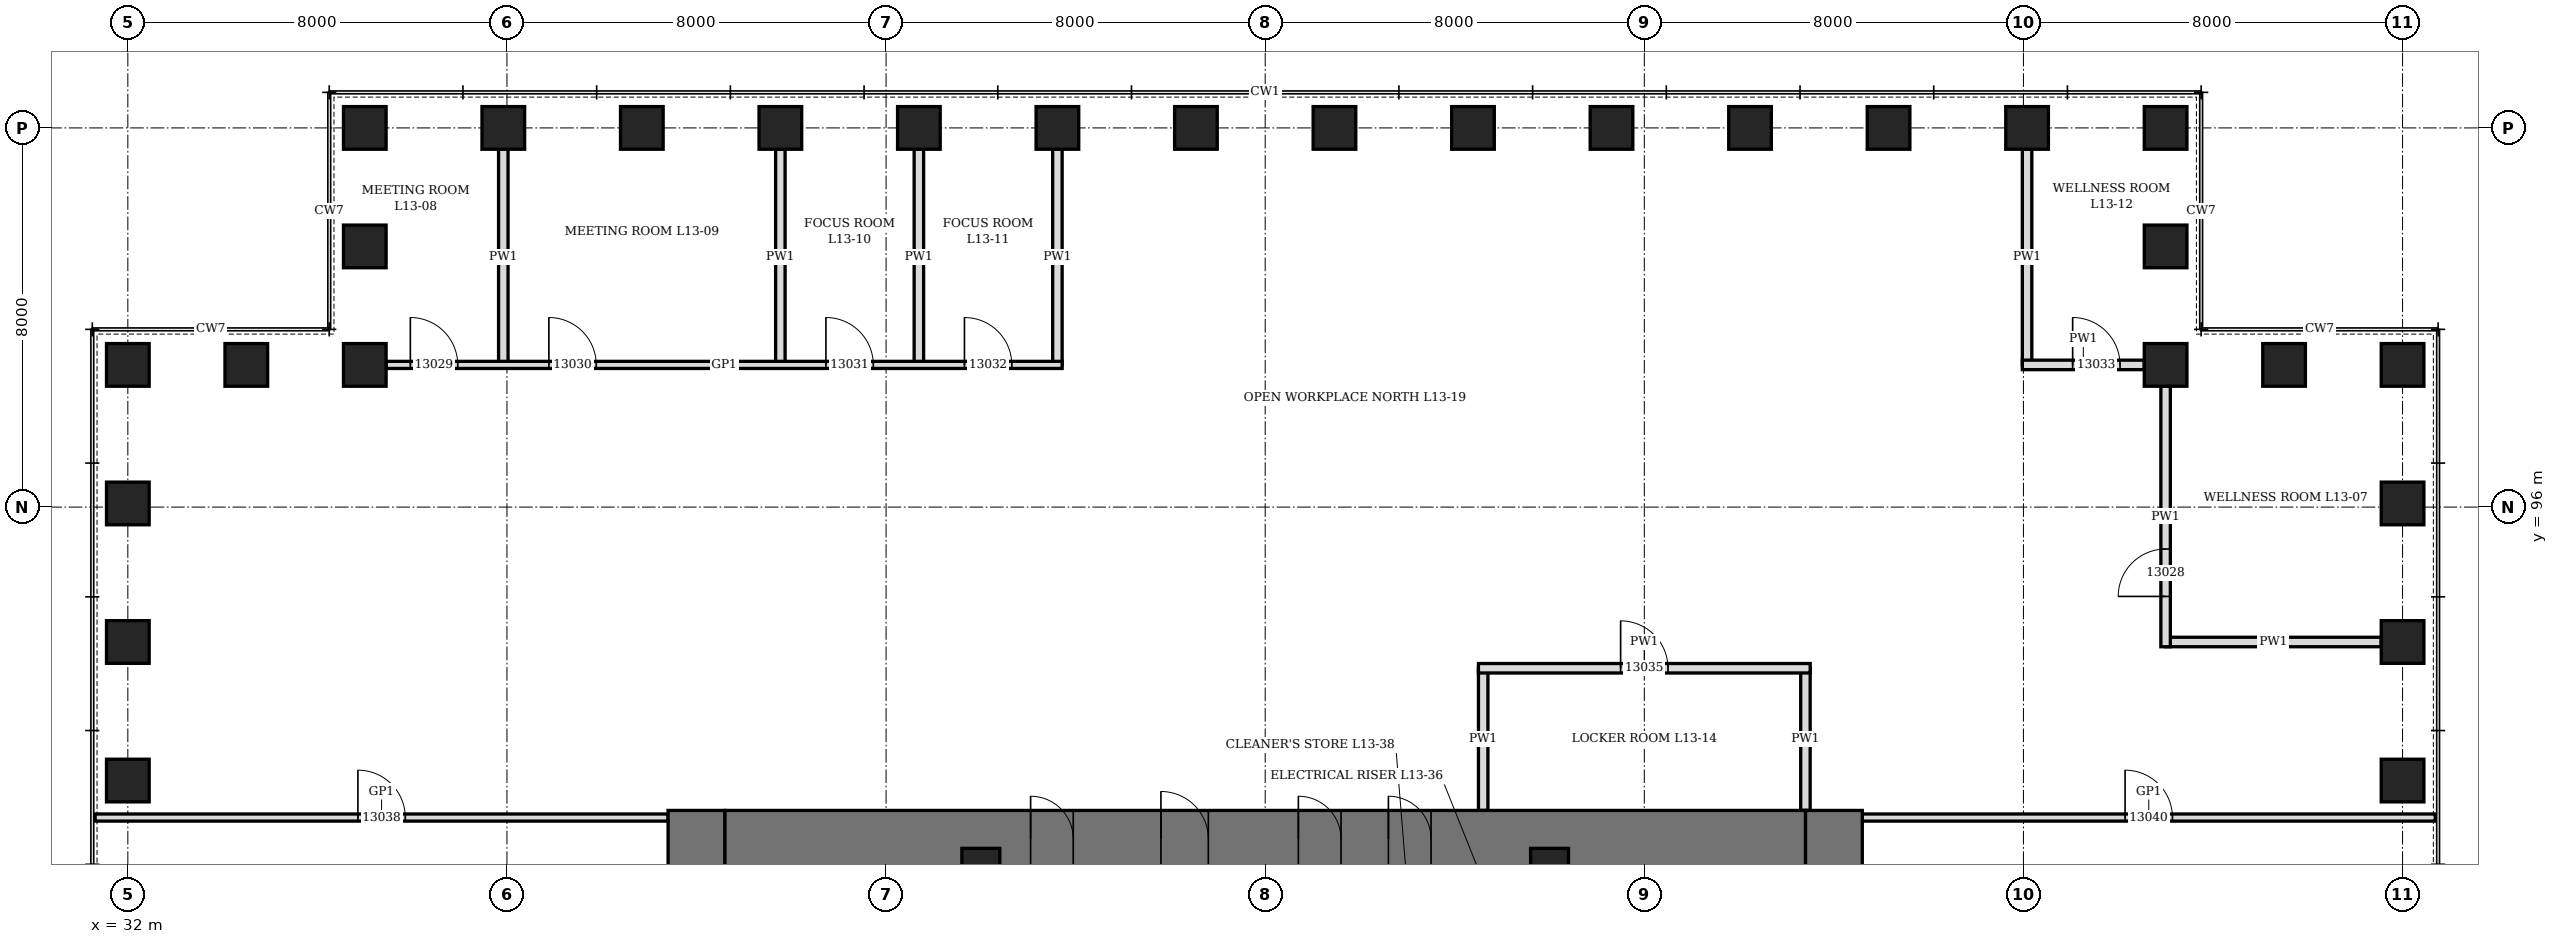
"""IFC4 building model, lengths in metres.
Left out: names, types, materials, properties, quantities, classifications, styles, units other than length and angle.
Written with IfcOpenShell. Run it as: python <this file> out.ifc"""

import sys

from ifc_helpers import new_model, si_unit, direction, frame, frame_2d, origin, origin_2d, place, context, subcontext, project, spatial, rectangle, hollow_rectangle, extrude, element, fill, save


model = new_model("IFC4")
c1 = context("Model", 3, precision=1e-05, world=origin(), true_north=direction((0.0, 1.0)))
c2 = subcontext(c1, "Body", "Model", "MODEL_VIEW")
j1 = project(units=[si_unit("LENGTHUNIT", "METRE"), si_unit("PLANEANGLEUNIT", "RADIAN")], contexts=[c1])
p1 = place(None, origin())
s1 = spatial("IfcSite", under=j1, at=p1, CompositionType="ELEMENT")
p2 = place(p1, origin())
s2 = spatial("IfcBuilding", under=s1, at=p2, CompositionType="ELEMENT")
p3 = place(p2, frame((0.0, 0.0, 64.3)))
s3 = spatial("IfcBuildingStorey", under=s2, at=p3, CompositionType="ELEMENT", Elevation=64.3)
for number, where, z_axis, x_axis in (
    (1, (80.0, 90.231, 0.0), (0.0, 0.0, 1.0), (0.0, 1.0, 0.0)),
    (2, (80.0, 93.154, 0.0), (0.0, 0.0, 1.0), (0.0, 1.0, 0.0)),
    (3, (80.0, 96.077, 0.0), (0.0, 0.0, 1.0), (0.0, 1.0, 0.0)),
    (4, (80.0, 99.0, 0.0), (0.0, 0.0, 1.0), (1.0, 0.0, 0.0)),
    (5, (77.5, 99.0, 0.0), (0.0, 0.0, 1.0), (1.0, 0.0, 0.0)),
    (6, (75.0, 99.0, 0.0), (0.0, 0.0, 1.0), (0.0, 1.0, 0.0)),
    (7, (75.0, 101.5, 0.0), (0.0, 0.0, 1.0), (0.0, 1.0, 0.0)),
    (8, (75.0, 104.0, 0.0), (0.0, 0.0, 1.0), (1.0, 0.0, 0.0)),
    (9, (72.077, 104.0, 0.0), (0.0, 0.0, 1.0), (1.0, 0.0, 0.0)),
    (10, (69.154, 104.0, 0.0), (0.0, 0.0, 1.0), (1.0, 0.0, 0.0)),
    (11, (66.231, 104.0, 0.0), (0.0, 0.0, 1.0), (1.0, 0.0, 0.0)),
    (12, (63.308, 104.0, 0.0), (0.0, 0.0, 1.0), (1.0, 0.0, 0.0)),
    (13, (60.385, 104.0, 0.0), (0.0, 0.0, 1.0), (1.0, 0.0, 0.0)),
    (14, (57.461, 104.0, 0.0), (0.0, 0.0, 1.0), (1.0, 0.0, 0.0)),
    (15, (54.539, 104.0, 0.0), (0.0, 0.0, 1.0), (1.0, 0.0, 0.0)),
    (16, (51.615, 104.0, 0.0), (0.0, 0.0, 1.0), (1.0, 0.0, 0.0)),
    (17, (48.692, 104.0, 0.0), (0.0, 0.0, 1.0), (1.0, 0.0, 0.0)),
    (18, (45.769, 104.0, 0.0), (0.0, 0.0, 1.0), (1.0, 0.0, 0.0)),
    (19, (42.846, 104.0, 0.0), (0.0, 0.0, 1.0), (1.0, 0.0, 0.0)),
    (20, (39.923, 104.0, 0.0), (0.0, 0.0, 1.0), (1.0, 0.0, 0.0)),
    (21, (37.0, 104.0, 0.0), (0.0, 0.0, 1.0), (0.0, 1.0, 0.0)),
    (22, (37.0, 101.5, 0.0), (0.0, 0.0, 1.0), (0.0, 1.0, 0.0)),
    (23, (37.0, 99.0, 0.0), (0.0, 0.0, 1.0), (1.0, 0.0, 0.0)),
    (24, (34.5, 99.0, 0.0), (0.0, 0.0, 1.0), (1.0, 0.0, 0.0)),
    (25, (32.0, 99.0, 0.0), (0.0, 0.0, 1.0), (0.0, 1.0, 0.0)),
    (26, (32.0, 96.077, 0.0), (0.0, 0.0, 1.0), (0.0, 1.0, 0.0)),
    (27, (32.0, 93.154, 0.0), (0.0, 0.0, 1.0), (0.0, 1.0, 0.0)),
    (28, (32.0, 90.231, 0.0), (0.0, 0.0, 1.0), (0.0, 1.0, 0.0)),
):
    element("IfcColumn", number, at=place(p3, frame(where, z_axis=z_axis, x_axis=x_axis)), inside=s3, PredefinedType="COLUMN", context=c2, shape_type="SweptSolid", body=[
        extrude(hollow_rectangle(XDim=0.9, YDim=0.9, WallThickness=0.12, at=origin_2d()), origin(), (0.0, 0.0, 1.0), 4.2),
    ])
p4 = place(p3, frame((44.0, 70.4, 0.0), z_axis=(0.0, 0.0, 1.0), x_axis=(0.0, 1.0, 0.0)))
e29 = element("IfcWall", 29, at=p4, inside=s3, PredefinedType="SHEAR", context=c2, shape_type="SweptSolid", body=[
    extrude(rectangle(XDim=19.2, YDim=1.2, at=frame_2d((9.6, 0.0))), origin(), (0.0, 0.0, 1.0), 4.2),
])
p5 = place(p4, frame((8.6, 0.0, 0.0)))
e30 = element("IfcOpeningElement", 30, at=p5, cuts=e29, PredefinedType="OPENING", context=c2, shape_type="SweptSolid", body=[
    extrude(rectangle(XDim=2.0, YDim=2.4, at=frame_2d((1.0, 1.2))), frame((0.0, 0.61, 0.0), z_axis=(0.0, -1.0, 0.0), x_axis=(1.0, 0.0, 0.0)), (0.0, 0.0, 1.0), 1.22),
])
p6 = place(p3, frame((68.0, 70.4, 0.0), z_axis=(0.0, 0.0, 1.0), x_axis=(0.0, 1.0, 0.0)))
e31 = element("IfcWall", 31, at=p6, inside=s3, PredefinedType="SHEAR", context=c2, shape_type="SweptSolid", body=[
    extrude(rectangle(XDim=19.2, YDim=1.2, at=frame_2d((9.6, 0.0))), origin(), (0.0, 0.0, 1.0), 4.2),
])
p7 = place(p6, frame((8.6, 0.0, 0.0)))
e32 = element("IfcOpeningElement", 32, at=p7, cuts=e31, PredefinedType="OPENING", context=c2, shape_type="SweptSolid", body=[
    extrude(rectangle(XDim=2.0, YDim=2.4, at=frame_2d((1.0, 1.2))), frame((0.0, 0.61, 0.0), z_axis=(0.0, -1.0, 0.0), x_axis=(1.0, 0.0, 0.0)), (0.0, 0.0, 1.0), 1.22),
])
p8 = place(p3, frame((44.6, 89.0, 0.0), z_axis=(0.0, 0.0, 1.0), x_axis=(1.0, 0.0, 0.0)))
e33 = element("IfcWall", 33, at=p8, inside=s3, PredefinedType="SHEAR", context=c2, shape_type="SweptSolid", body=[
    extrude(rectangle(XDim=22.8, YDim=1.2, at=frame_2d((11.4, 0.0))), origin(), (0.0, 0.0, 1.0), 4.2),
])
p9 = place(p8, frame((9.2, 0.0, 0.0)))
e34 = element("IfcOpeningElement", 34, at=p9, cuts=e33, PredefinedType="OPENING", context=c2, shape_type="SweptSolid", body=[
    extrude(rectangle(XDim=1.0, YDim=2.1, at=frame_2d((0.5, 1.05))), frame((0.0, 0.61, 0.0), z_axis=(0.0, -1.0, 0.0), x_axis=(1.0, 0.0, 0.0)), (0.0, 0.0, 1.0), 1.22),
])
p10 = place(p8, frame((6.45, 0.0, 0.0)))
e35 = element("IfcOpeningElement", 35, at=p10, cuts=e33, PredefinedType="OPENING", context=c2, shape_type="SweptSolid", body=[
    extrude(rectangle(XDim=0.9, YDim=2.1, at=frame_2d((0.45, 1.05))), frame((0.0, 0.61, 0.0), z_axis=(0.0, -1.0, 0.0), x_axis=(1.0, 0.0, 0.0)), (0.0, 0.0, 1.0), 1.22),
])
p11 = place(p8, frame((12.1, 0.0, 0.0)))
e36 = element("IfcOpeningElement", 36, at=p11, cuts=e33, PredefinedType="OPENING", context=c2, shape_type="SweptSolid", body=[
    extrude(rectangle(XDim=0.9, YDim=2.1, at=frame_2d((0.45, 1.05))), frame((0.0, 0.61, 0.0), z_axis=(0.0, -1.0, 0.0), x_axis=(1.0, 0.0, 0.0)), (0.0, 0.0, 1.0), 1.22),
])
p12 = place(p8, frame((14.0, 0.0, 0.0)))
e37 = element("IfcOpeningElement", 37, at=p12, cuts=e33, PredefinedType="OPENING", context=c2, shape_type="SweptSolid", body=[
    extrude(rectangle(XDim=0.9, YDim=2.1, at=frame_2d((0.45, 1.05))), frame((0.0, 0.61, 0.0), z_axis=(0.0, -1.0, 0.0), x_axis=(1.0, 0.0, 0.0)), (0.0, 0.0, 1.0), 1.22),
])
for number, where, z_axis, x_axis in (
    (38, (50.0, 88.4, 0.0), (0.0, 0.0, 1.0), (1.0, 0.0, 0.0)),
    (39, (62.0, 88.4, 0.0), (0.0, 0.0, 1.0), (1.0, 0.0, 0.0)),
):
    element("IfcColumn", number, at=place(p3, frame(where, z_axis=z_axis, x_axis=x_axis)), inside=s3, PredefinedType="COLUMN", context=c2, shape_type="SweptSolid", body=[
        extrude(hollow_rectangle(XDim=0.8, YDim=0.8, WallThickness=0.1, at=origin_2d()), origin(), (0.0, 0.0, 1.0), 4.2),
    ])
for number, where, z_axis, x_axis in (
    (40, (75.0, 93.154, 0.0), (0.0, 0.0, 1.0), (1.0, 0.0, 0.0)),
    (41, (39.923, 99.0, 0.0), (0.0, 0.0, 1.0), (0.0, 1.0, 0.0)),
):
    element("IfcWall", number, at=place(p3, frame(where, z_axis=z_axis, x_axis=x_axis)), inside=s3, PredefinedType="PARTITIONING", context=c2, shape_type="SweptSolid", body=[
        extrude(rectangle(XDim=4.55, YDim=0.2, at=frame_2d((2.275, 0.0))), origin(), (0.0, 0.0, 1.0), 3.428),
    ])
for number, where, z_axis, x_axis in (
    (42, (45.769, 99.0, 0.0), (0.0, 0.0, 1.0), (0.0, 1.0, 0.0)),
    (43, (48.692, 99.0, 0.0), (0.0, 0.0, 1.0), (0.0, 1.0, 0.0)),
    (44, (51.615, 99.0, 0.0), (0.0, 0.0, 1.0), (0.0, 1.0, 0.0)),
):
    element("IfcWall", number, at=place(p3, frame(where, z_axis=z_axis, x_axis=x_axis)), inside=s3, PredefinedType="PARTITIONING", context=c2, shape_type="SweptSolid", body=[
        extrude(rectangle(XDim=4.55, YDim=0.2, at=frame_2d((2.275, 0.0))), origin(), (0.0, 0.0, 1.0), 3.278),
    ])
p13 = place(p3, frame((72.077, 99.0, 0.0), z_axis=(0.0, 0.0, 1.0), x_axis=(0.0, 1.0, 0.0)))
e45 = element("IfcWall", 45, at=p13, inside=s3, PredefinedType="PARTITIONING", context=c2, shape_type="SweptSolid", body=[
    extrude(rectangle(XDim=4.55, YDim=0.2, at=frame_2d((2.275, 0.0))), origin(), (0.0, 0.0, 1.0), 3.428),
])
for number, where, z_axis, x_axis in (
    (46, (60.6, 89.6, 0.0), (0.0, 0.0, 1.0), (0.0, 1.0, 0.0)),
    (47, (67.4, 89.6, 0.0), (0.0, 0.0, 1.0), (0.0, 1.0, 0.0)),
):
    element("IfcWall", number, at=place(p3, frame(where, z_axis=z_axis, x_axis=x_axis)), inside=s3, PredefinedType="PARTITIONING", context=c2, shape_type="SweptSolid", body=[
        extrude(rectangle(XDim=3.0, YDim=0.2, at=frame_2d((1.5, 0.0))), origin(), (0.0, 0.0, 1.0), 4.04),
    ])
p14 = place(p3, frame((31.31, 89.45, 0.0), z_axis=(0.0, 0.0, 1.0), x_axis=(1.0, 0.0, 0.0)))
e48 = element("IfcWall", 48, at=p14, inside=s3, PredefinedType="PARTITIONING", context=c2, shape_type="SweptSolid", body=[
    extrude(rectangle(XDim=12.09, YDim=0.15, at=frame_2d((6.045, 0.0))), origin(), (0.0, 0.0, 1.0), 4.04),
])
p15 = place(p14, frame((5.545, 0.0, 0.0)))
e49 = element("IfcOpeningElement", 49, at=p15, cuts=e48, PredefinedType="OPENING", context=c2, shape_type="SweptSolid", body=[
    extrude(rectangle(XDim=1.0, YDim=2.4, at=frame_2d((0.5, 1.2))), frame((0.0, 0.085, 0.0), z_axis=(0.0, -1.0, 0.0), x_axis=(1.0, 0.0, 0.0)), (0.0, 0.0, 1.0), 0.17),
])
p16 = place(p3, frame((68.6, 89.45, 0.0), z_axis=(0.0, 0.0, 1.0), x_axis=(1.0, 0.0, 0.0)))
e50 = element("IfcWall", 50, at=p16, inside=s3, PredefinedType="PARTITIONING", context=c2, shape_type="SweptSolid", body=[
    extrude(rectangle(XDim=12.09, YDim=0.15, at=frame_2d((6.045, 0.0))), origin(), (0.0, 0.0, 1.0), 4.04),
])
p17 = place(p16, frame((5.545, 0.0, 0.0)))
e51 = element("IfcOpeningElement", 51, at=p17, cuts=e50, PredefinedType="OPENING", context=c2, shape_type="SweptSolid", body=[
    extrude(rectangle(XDim=1.0, YDim=2.4, at=frame_2d((0.5, 1.2))), frame((0.0, 0.085, 0.0), z_axis=(0.0, -1.0, 0.0), x_axis=(1.0, 0.0, 0.0)), (0.0, 0.0, 1.0), 0.17),
])
p18 = place(p3, frame((60.5, 92.6, 0.0), z_axis=(0.0, 0.0, 1.0), x_axis=(1.0, 0.0, 0.0)))
e52 = element("IfcWall", 52, at=p18, inside=s3, PredefinedType="PARTITIONING", context=c2, shape_type="SweptSolid", body=[
    extrude(rectangle(XDim=7.0, YDim=0.2, at=frame_2d((3.5, 0.0))), origin(), (0.0, 0.0, 1.0), 4.04),
])
p19 = place(p18, frame((3.0, 0.0, 0.0)))
e53 = element("IfcOpeningElement", 53, at=p19, cuts=e52, PredefinedType="OPENING", context=c2, shape_type="SweptSolid", body=[
    extrude(rectangle(XDim=1.0, YDim=2.1, at=frame_2d((0.5, 1.05))), frame((0.0, 0.11, 0.0), z_axis=(0.0, -1.0, 0.0), x_axis=(1.0, 0.0, 0.0)), (0.0, 0.0, 1.0), 0.22),
])
p20 = place(p3, frame((37.45, 99.0, 0.0), z_axis=(0.0, 0.0, 1.0), x_axis=(1.0, 0.0, 0.0)))
e54 = element("IfcWall", 54, at=p20, inside=s3, PredefinedType="PARTITIONING", context=c2, shape_type="SweptSolid", body=[
    extrude(rectangle(XDim=14.265, YDim=0.15, at=frame_2d((7.133, 0.0))), origin(), (0.0, 0.0, 1.0), 4.04),
])
p21 = place(p20, frame((0.511, 0.0, 0.0)))
e55 = element("IfcOpeningElement", 55, at=p21, cuts=e54, PredefinedType="OPENING", context=c2, shape_type="SweptSolid", body=[
    extrude(rectangle(XDim=1.0, YDim=2.4, at=frame_2d((0.5, 1.2))), frame((0.0, 0.085, 0.0), z_axis=(0.0, -1.0, 0.0), x_axis=(1.0, 0.0, 0.0)), (0.0, 0.0, 1.0), 0.17),
])
p22 = place(p20, frame((3.435, 0.0, 0.0)))
e56 = element("IfcOpeningElement", 56, at=p22, cuts=e54, PredefinedType="OPENING", context=c2, shape_type="SweptSolid", body=[
    extrude(rectangle(XDim=1.0, YDim=2.4, at=frame_2d((0.5, 1.2))), frame((0.0, 0.085, 0.0), z_axis=(0.0, -1.0, 0.0), x_axis=(1.0, 0.0, 0.0)), (0.0, 0.0, 1.0), 0.17),
])
p23 = place(p20, frame((9.281, 0.0, 0.0)))
e57 = element("IfcOpeningElement", 57, at=p23, cuts=e54, PredefinedType="OPENING", context=c2, shape_type="SweptSolid", body=[
    extrude(rectangle(XDim=1.0, YDim=2.4, at=frame_2d((0.5, 1.2))), frame((0.0, 0.085, 0.0), z_axis=(0.0, -1.0, 0.0), x_axis=(1.0, 0.0, 0.0)), (0.0, 0.0, 1.0), 0.17),
])
p24 = place(p20, frame((12.204, 0.0, 0.0)))
e58 = element("IfcOpeningElement", 58, at=p24, cuts=e54, PredefinedType="OPENING", context=c2, shape_type="SweptSolid", body=[
    extrude(rectangle(XDim=1.0, YDim=2.4, at=frame_2d((0.5, 1.2))), frame((0.0, 0.085, 0.0), z_axis=(0.0, -1.0, 0.0), x_axis=(1.0, 0.0, 0.0)), (0.0, 0.0, 1.0), 0.17),
])
p25 = place(p3, frame((71.977, 99.0, 0.0), z_axis=(0.0, 0.0, 1.0), x_axis=(1.0, 0.0, 0.0)))
e59 = element("IfcWall", 59, at=p25, inside=s3, PredefinedType="PARTITIONING", context=c2, shape_type="SweptSolid", body=[
    extrude(rectangle(XDim=2.573, YDim=0.2, at=frame_2d((1.287, 0.0))), origin(), (0.0, 0.0, 1.0), 4.04),
])
p26 = place(p25, frame((1.062, 0.0, 0.0)))
e60 = element("IfcOpeningElement", 60, at=p26, cuts=e59, PredefinedType="OPENING", context=c2, shape_type="SweptSolid", body=[
    extrude(rectangle(XDim=1.0, YDim=2.1, at=frame_2d((0.5, 1.05))), frame((0.0, 0.11, 0.0), z_axis=(0.0, -1.0, 0.0), x_axis=(1.0, 0.0, 0.0)), (0.0, 0.0, 1.0), 0.22),
])
p27 = place(p3, frame((75.0, 93.054, 0.0), z_axis=(0.0, 0.0, 1.0), x_axis=(0.0, 1.0, 0.0)))
e61 = element("IfcWall", 61, at=p27, inside=s3, PredefinedType="PARTITIONING", context=c2, shape_type="SweptSolid", body=[
    extrude(rectangle(XDim=5.496, YDim=0.2, at=frame_2d((2.748, 0.0))), origin(), (0.0, 0.0, 1.0), 4.04),
])
p28 = place(p27, frame((1.062, 0.0, 0.0)))
e62 = element("IfcOpeningElement", 62, at=p28, cuts=e61, PredefinedType="OPENING", context=c2, shape_type="SweptSolid", body=[
    extrude(rectangle(XDim=1.0, YDim=2.1, at=frame_2d((0.5, 1.05))), frame((0.0, 0.11, 0.0), z_axis=(0.0, -1.0, 0.0), x_axis=(1.0, 0.0, 0.0)), (0.0, 0.0, 1.0), 0.22),
])
p29 = place(p9, origin())
e63 = element("IfcDoor", 63, at=p29, inside=s3, OperationType="SINGLE_SWING_LEFT", PredefinedType="DOOR", context=c2, shape_type="SweptSolid", body=[
    extrude(rectangle(XDim=1.0, YDim=2.1, at=frame_2d((0.5, 1.05))), frame((0.0, 0.35, 0.0), z_axis=(0.0, -1.0, 0.0), x_axis=(1.0, 0.0, 0.0)), (0.0, 0.0, 1.0), 0.7),
])
fill(e34, e63)
p30 = place(p10, origin())
e64 = element("IfcDoor", 64, at=p30, inside=s3, OperationType="SINGLE_SWING_LEFT", PredefinedType="DOOR", context=c2, shape_type="SweptSolid", body=[
    extrude(rectangle(XDim=0.9, YDim=2.1, at=frame_2d((0.45, 1.05))), frame((0.0, 0.35, 0.0), z_axis=(0.0, -1.0, 0.0), x_axis=(1.0, 0.0, 0.0)), (0.0, 0.0, 1.0), 0.7),
])
fill(e35, e64)
p31 = place(p11, origin())
e65 = element("IfcDoor", 65, at=p31, inside=s3, OperationType="SINGLE_SWING_LEFT", PredefinedType="DOOR", context=c2, shape_type="SweptSolid", body=[
    extrude(rectangle(XDim=0.9, YDim=2.1, at=frame_2d((0.45, 1.05))), frame((0.0, 0.35, 0.0), z_axis=(0.0, -1.0, 0.0), x_axis=(1.0, 0.0, 0.0)), (0.0, 0.0, 1.0), 0.7),
])
fill(e36, e65)
p32 = place(p12, origin())
e66 = element("IfcDoor", 66, at=p32, inside=s3, OperationType="SINGLE_SWING_LEFT", PredefinedType="DOOR", context=c2, shape_type="SweptSolid", body=[
    extrude(rectangle(XDim=0.9, YDim=2.1, at=frame_2d((0.45, 1.05))), frame((0.0, 0.35, 0.0), z_axis=(0.0, -1.0, 0.0), x_axis=(1.0, 0.0, 0.0)), (0.0, 0.0, 1.0), 0.7),
])
fill(e37, e66)
p33 = place(p28, origin())
e67 = element("IfcDoor", 67, at=p33, inside=s3, OperationType="SINGLE_SWING_LEFT", PredefinedType="DOOR", context=c2, shape_type="SweptSolid", body=[
    extrude(rectangle(XDim=1.0, YDim=2.1, at=frame_2d((0.5, 1.05))), frame((0.0, 0.1, 0.0), z_axis=(0.0, -1.0, 0.0), x_axis=(1.0, 0.0, 0.0)), (0.0, 0.0, 1.0), 0.199),
])
fill(e62, e67)
p34 = place(p21, origin())
e68 = element("IfcDoor", 68, at=p34, inside=s3, OperationType="SINGLE_SWING_RIGHT", PredefinedType="DOOR", context=c2, shape_type="SweptSolid", body=[
    extrude(rectangle(XDim=1.0, YDim=2.4, at=frame_2d((0.5, 1.2))), frame((0.0, 0.075, 0.0), z_axis=(0.0, -1.0, 0.0), x_axis=(1.0, 0.0, 0.0)), (0.0, 0.0, 1.0), 0.149),
])
fill(e55, e68)
p35 = place(p22, origin())
e69 = element("IfcDoor", 69, at=p35, inside=s3, OperationType="SINGLE_SWING_RIGHT", PredefinedType="DOOR", context=c2, shape_type="SweptSolid", body=[
    extrude(rectangle(XDim=1.0, YDim=2.4, at=frame_2d((0.5, 1.2))), frame((0.0, 0.075, 0.0), z_axis=(0.0, -1.0, 0.0), x_axis=(1.0, 0.0, 0.0)), (0.0, 0.0, 1.0), 0.149),
])
fill(e56, e69)
p36 = place(p23, origin())
e70 = element("IfcDoor", 70, at=p36, inside=s3, OperationType="SINGLE_SWING_RIGHT", PredefinedType="DOOR", context=c2, shape_type="SweptSolid", body=[
    extrude(rectangle(XDim=1.0, YDim=2.4, at=frame_2d((0.5, 1.2))), frame((0.0, 0.075, 0.0), z_axis=(0.0, -1.0, 0.0), x_axis=(1.0, 0.0, 0.0)), (0.0, 0.0, 1.0), 0.149),
])
fill(e57, e70)
p37 = place(p24, origin())
e71 = element("IfcDoor", 71, at=p37, inside=s3, OperationType="SINGLE_SWING_RIGHT", PredefinedType="DOOR", context=c2, shape_type="SweptSolid", body=[
    extrude(rectangle(XDim=1.0, YDim=2.4, at=frame_2d((0.5, 1.2))), frame((0.0, 0.075, 0.0), z_axis=(0.0, -1.0, 0.0), x_axis=(1.0, 0.0, 0.0)), (0.0, 0.0, 1.0), 0.149),
])
fill(e58, e71)
p38 = place(p26, origin())
e72 = element("IfcDoor", 72, at=p38, inside=s3, OperationType="SINGLE_SWING_LEFT", PredefinedType="DOOR", context=c2, shape_type="SweptSolid", body=[
    extrude(rectangle(XDim=1.0, YDim=2.1, at=frame_2d((0.5, 1.05))), frame((0.0, 0.1, 0.0), z_axis=(0.0, -1.0, 0.0), x_axis=(1.0, 0.0, 0.0)), (0.0, 0.0, 1.0), 0.199),
])
fill(e60, e72)
p39 = place(p19, origin())
e73 = element("IfcDoor", 73, at=p39, inside=s3, OperationType="SINGLE_SWING_LEFT", PredefinedType="DOOR", context=c2, shape_type="SweptSolid", body=[
    extrude(rectangle(XDim=1.0, YDim=2.1, at=frame_2d((0.5, 1.05))), frame((0.0, 0.1, 0.0), z_axis=(0.0, -1.0, 0.0), x_axis=(1.0, 0.0, 0.0)), (0.0, 0.0, 1.0), 0.199),
])
fill(e53, e73)
p40 = place(p15, origin())
e74 = element("IfcDoor", 74, at=p40, inside=s3, OperationType="SINGLE_SWING_RIGHT", PredefinedType="DOOR", context=c2, shape_type="SweptSolid", body=[
    extrude(rectangle(XDim=1.0, YDim=2.4, at=frame_2d((0.5, 1.2))), frame((0.0, 0.075, 0.0), z_axis=(0.0, -1.0, 0.0), x_axis=(1.0, 0.0, 0.0)), (0.0, 0.0, 1.0), 0.149),
])
fill(e49, e74)
p41 = place(p17, origin())
e75 = element("IfcDoor", 75, at=p41, inside=s3, OperationType="SINGLE_SWING_RIGHT", PredefinedType="DOOR", context=c2, shape_type="SweptSolid", body=[
    extrude(rectangle(XDim=1.0, YDim=2.4, at=frame_2d((0.5, 1.2))), frame((0.0, 0.075, 0.0), z_axis=(0.0, -1.0, 0.0), x_axis=(1.0, 0.0, 0.0)), (0.0, 0.0, 1.0), 0.149),
])
fill(e51, e75)
save(model, sys.argv[1])
